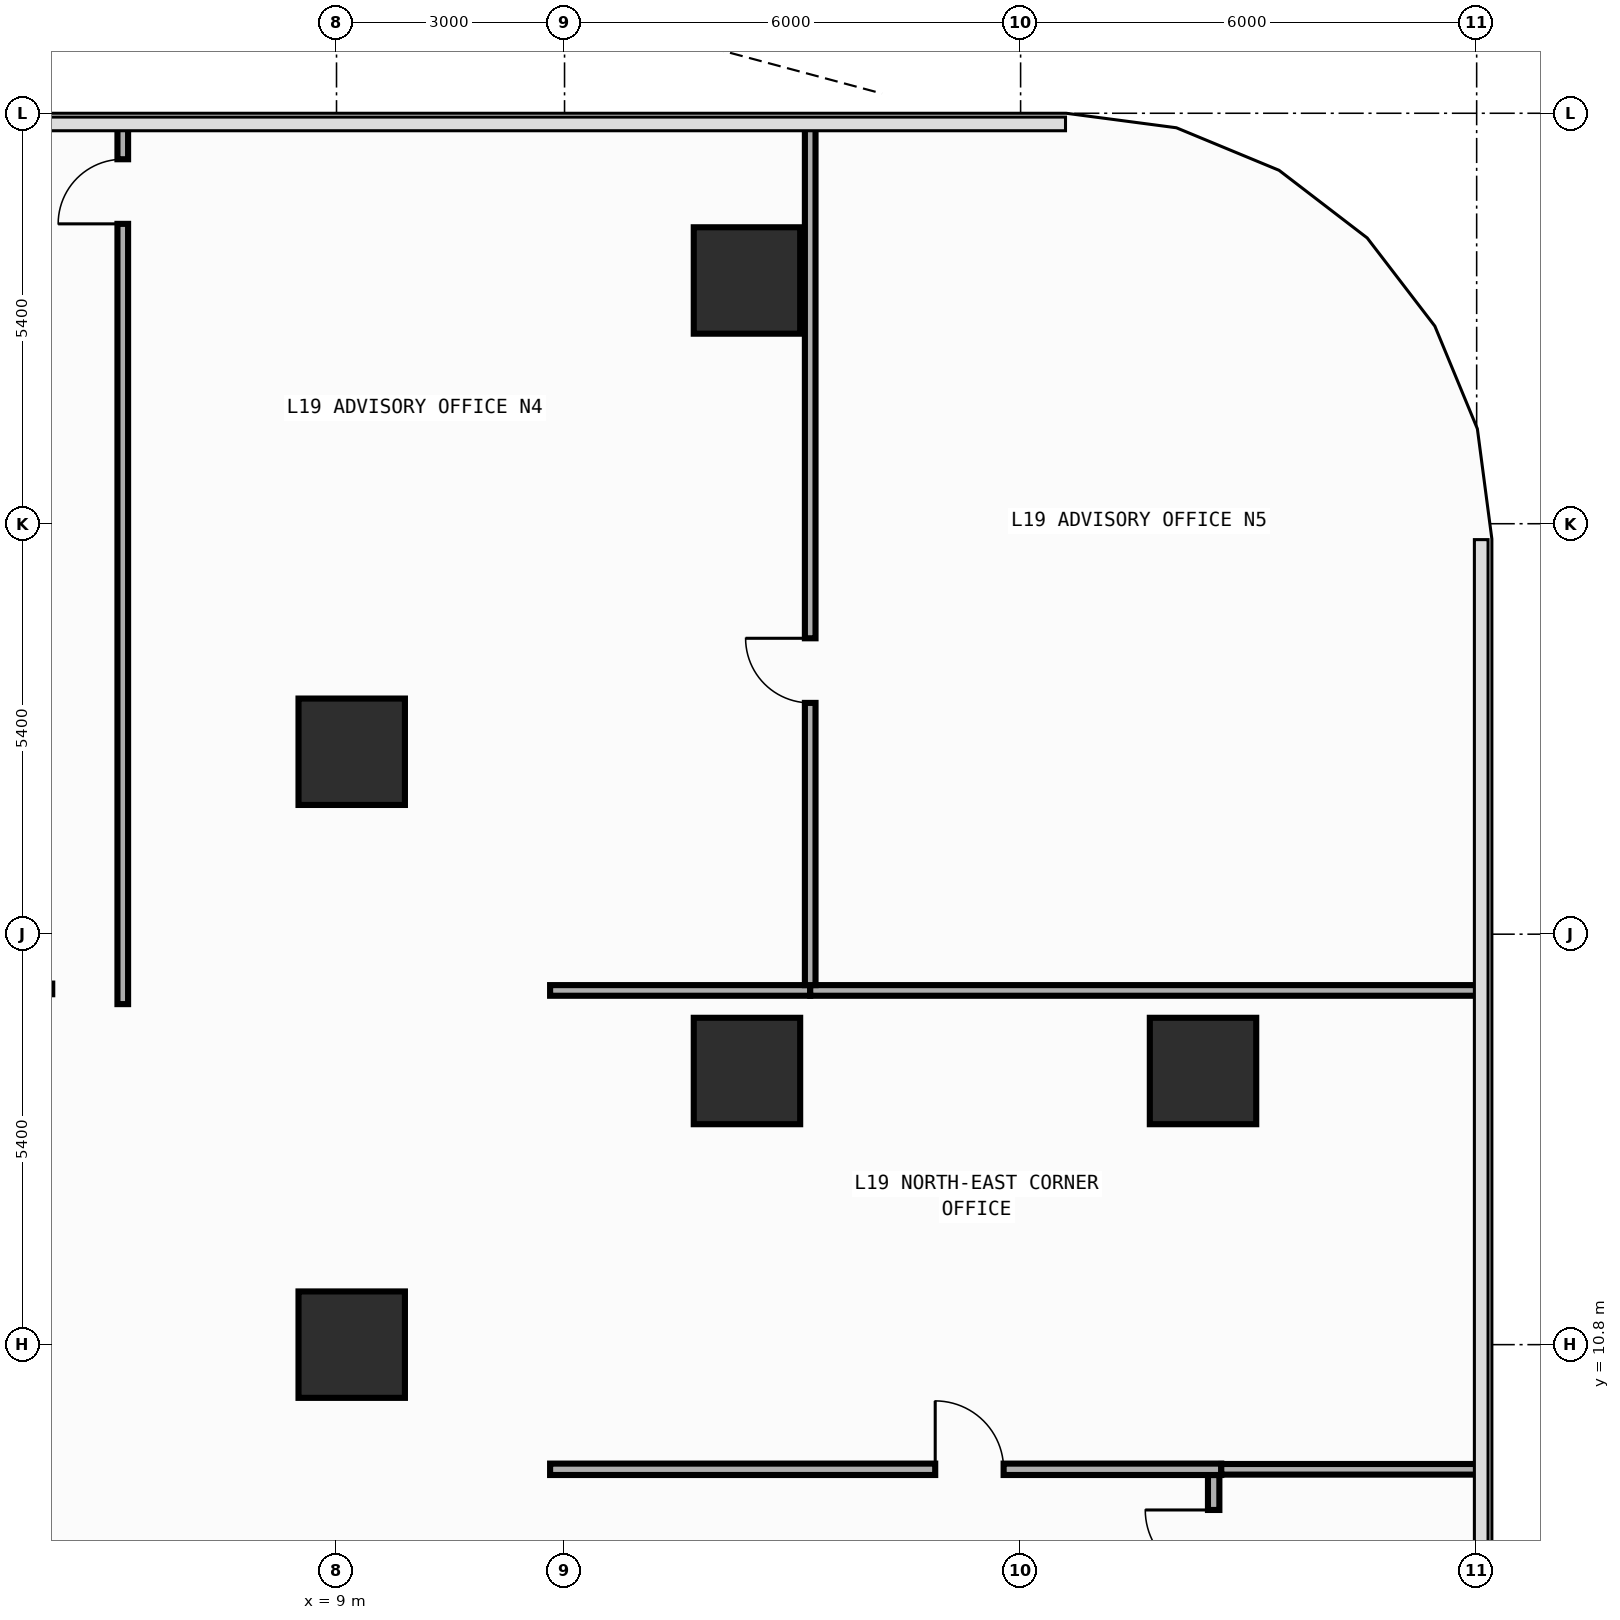
"""IFC4 building model, lengths in metres.
Left out: names, types, materials, properties, quantities, classifications, styles, units other than length and angle.
Written with IfcOpenShell. Run it as: python <this file> out.ifc"""

import sys

from ifc_helpers import new_model, si_unit, direction, frame, frame_2d, origin, origin_2d, place, context, subcontext, project, spatial, rectangle, extrude, element, fill, save


model = new_model("IFC4")
c1 = context("Model", 3, precision=1e-05, world=origin(), true_north=direction((0.0, 1.0)))
c2 = subcontext(c1, "Body", "Model", "MODEL_VIEW")
j1 = project(units=[si_unit("LENGTHUNIT", "METRE"), si_unit("PLANEANGLEUNIT", "RADIAN")], contexts=[c1])
p1 = place(None, origin())
s1 = spatial("IfcSite", under=j1, at=p1, CompositionType="ELEMENT")
p2 = place(p1, origin())
s2 = spatial("IfcBuilding", under=s1, at=p2, CompositionType="ELEMENT")
p3 = place(p2, frame((0.0, 0.0, 80.6)))
s3 = spatial("IfcBuildingStorey", under=s2, at=p3, CompositionType="ELEMENT", Elevation=80.6)
for number, where, z_axis, x_axis in (
    (1, (9.2, 10.8, 0.0), (0.0, 0.0, 1.0), (1.0, 0.0, 0.0)),
    (2, (9.2, 18.6, 0.0), (0.0, 0.0, 1.0), (1.0, 0.0, 0.0)),
    (3, (20.4, 14.4, 0.0), (0.0, 0.0, 1.0), (1.0, 0.0, 0.0)),
    (4, (14.4, 14.4, 0.0), (0.0, 0.0, 1.0), (1.0, 0.0, 0.0)),
    (5, (14.4, 24.8, 0.0), (0.0, 0.0, 1.0), (1.0, 0.0, 0.0)),
):
    element("IfcColumn", number, at=place(p3, frame(where, z_axis=z_axis, x_axis=x_axis)), inside=s3, PredefinedType="COLUMN", context=c2, shape_type="SweptSolid", body=[
        extrude(rectangle(XDim=1.4, YDim=1.4, at=origin_2d()), origin(), (0.0, 0.0, 1.0), 4.2),
    ])
p4 = place(p3, frame((20.54, 7.06, 0.0), z_axis=(0.0, 0.0, 1.0), x_axis=(0.0, 1.0, 0.0)))
e6 = element("IfcWall", 6, at=p4, inside=s3, PredefinedType="PARTITIONING", context=c2, shape_type="SweptSolid", body=[
    extrude(rectangle(XDim=2.025, YDim=0.15, at=frame_2d((1.012, 0.0))), origin(), (0.0, 0.0, 1.0), 3.85),
])
p5 = place(p4, frame((0.665, 0.0, 0.0)))
e7 = element("IfcOpeningElement", 7, at=p5, cuts=e6, PredefinedType="OPENING", context=c2, shape_type="SweptSolid", body=[
    extrude(rectangle(XDim=0.9, YDim=2.15, at=frame_2d((0.45, 1.075))), frame((0.0, 0.085, 0.0), z_axis=(0.0, -1.0, 0.0), x_axis=(1.0, 0.0, 0.0)), (0.0, 0.0, 1.0), 0.17),
])
p6 = place(p3, frame((11.81, 9.16, 0.0), z_axis=(0.0, 0.0, 1.0), x_axis=(1.0, 0.0, 0.0)))
e8 = element("IfcWall", 8, at=p6, inside=s3, PredefinedType="PARTITIONING", context=c2, shape_type="SweptSolid", body=[
    extrude(rectangle(XDim=8.83, YDim=0.15, at=frame_2d((4.415, 0.0))), origin(), (0.0, 0.0, 1.0), 3.85),
])
p7 = place(p6, frame((5.067, 0.0, 0.0)))
e9 = element("IfcOpeningElement", 9, at=p7, cuts=e8, PredefinedType="OPENING", context=c2, shape_type="SweptSolid", body=[
    extrude(rectangle(XDim=0.9, YDim=2.15, at=frame_2d((0.45, 1.075))), frame((0.0, 0.085, 0.0), z_axis=(0.0, -1.0, 0.0), x_axis=(1.0, 0.0, 0.0)), (0.0, 0.0, 1.0), 0.17),
])
p8 = place(p3, frame((20.64, 9.16, 0.0), z_axis=(0.0, 0.0, 1.0), x_axis=(1.0, 0.0, 0.0)))
e10 = element("IfcWall", 10, at=p8, inside=s3, PredefinedType="PARTITIONING", context=c2, shape_type="SweptSolid", body=[
    extrude(rectangle(XDim=3.415, YDim=0.14, at=frame_2d((1.708, 0.0))), origin(), (0.0, 0.0, 1.0), 3.85),
])
p9 = place(p3, frame((11.81, 15.46, 0.0), z_axis=(0.0, 0.0, 1.0), x_axis=(1.0, 0.0, 0.0)))
e11 = element("IfcWall", 11, at=p9, inside=s3, PredefinedType="PARTITIONING", context=c2, shape_type="SweptSolid", body=[
    extrude(rectangle(XDim=3.422, YDim=0.14, at=frame_2d((1.711, 0.0))), origin(), (0.0, 0.0, 1.0), 3.85),
])
p10 = place(p3, frame((15.232, 15.46, 0.0), z_axis=(0.0, 0.0, 1.0), x_axis=(1.0, 0.0, 0.0)))
e12 = element("IfcWall", 12, at=p10, inside=s3, PredefinedType="PARTITIONING", context=c2, shape_type="SweptSolid", body=[
    extrude(rectangle(XDim=8.823, YDim=0.14, at=frame_2d((4.412, 0.0))), origin(), (0.0, 0.0, 1.0), 3.85),
])
p11 = place(p3, frame((6.188, 15.28, 0.0), z_axis=(0.0, 0.0, 1.0), x_axis=(0.0, 1.0, 0.0)))
e13 = element("IfcWall", 13, at=p11, inside=s3, PredefinedType="PARTITIONING", context=c2, shape_type="SweptSolid", body=[
    extrude(rectangle(XDim=11.575, YDim=0.14, at=frame_2d((5.788, 0.0))), origin(), (0.0, 0.0, 1.0), 3.85),
])
p12 = place(p11, frame((10.265, 0.0, 0.0)))
e14 = element("IfcOpeningElement", 14, at=p12, cuts=e13, PredefinedType="OPENING", context=c2, shape_type="SweptSolid", body=[
    extrude(rectangle(XDim=0.85, YDim=2.1, at=frame_2d((0.425, 1.05))), frame((0.0, 0.08, 0.0), z_axis=(0.0, -1.0, 0.0), x_axis=(1.0, 0.0, 0.0)), (0.0, 0.0, 1.0), 0.16),
])
p13 = place(p3, frame((15.232, 15.53, 0.0), z_axis=(0.0, 0.0, 1.0), x_axis=(0.0, 1.0, 0.0)))
e15 = element("IfcWall", 15, at=p13, inside=s3, PredefinedType="PARTITIONING", context=c2, shape_type="SweptSolid", body=[
    extrude(rectangle(XDim=11.325, YDim=0.14, at=frame_2d((5.663, 0.0))), origin(), (0.0, 0.0, 1.0), 3.85),
])
p14 = place(p13, frame((3.713, 0.0, 0.0)))
e16 = element("IfcOpeningElement", 16, at=p14, cuts=e15, PredefinedType="OPENING", context=c2, shape_type="SweptSolid", body=[
    extrude(rectangle(XDim=0.85, YDim=2.1, at=frame_2d((0.425, 1.05))), frame((0.0, 0.08, 0.0), z_axis=(0.0, -1.0, 0.0), x_axis=(1.0, 0.0, 0.0)), (0.0, 0.0, 1.0), 0.16),
])
p15 = place(p5, origin())
e17 = element("IfcDoor", 17, at=p15, inside=s3, OperationType="SINGLE_SWING_RIGHT", PredefinedType="DOOR", context=c2, shape_type="SweptSolid", body=[
    extrude(rectangle(XDim=0.9, YDim=2.15, at=frame_2d((0.45, 1.075))), frame((0.0, 0.025, 0.0), z_axis=(0.0, -1.0, 0.0), x_axis=(1.0, 0.0, 0.0)), (0.0, 0.0, 1.0), 0.05),
])
fill(e7, e17)
p16 = place(p7, origin())
e18 = element("IfcDoor", 18, at=p16, inside=s3, OperationType="SINGLE_SWING_LEFT", PredefinedType="DOOR", context=c2, shape_type="SweptSolid", body=[
    extrude(rectangle(XDim=0.9, YDim=2.15, at=frame_2d((0.45, 1.075))), frame((0.0, 0.025, 0.0), z_axis=(0.0, -1.0, 0.0), x_axis=(1.0, 0.0, 0.0)), (0.0, 0.0, 1.0), 0.05),
])
fill(e9, e18)
p17 = place(p12, origin())
e19 = element("IfcDoor", 19, at=p17, inside=s3, OperationType="SINGLE_SWING_LEFT", PredefinedType="DOOR", context=c2, shape_type="SweptSolid", body=[
    extrude(rectangle(XDim=0.85, YDim=2.1, at=frame_2d((0.425, 1.05))), frame((0.0, 0.025, 0.0), z_axis=(0.0, -1.0, 0.0), x_axis=(1.0, 0.0, 0.0)), (0.0, 0.0, 1.0), 0.05),
])
fill(e14, e19)
p18 = place(p14, origin())
e20 = element("IfcDoor", 20, at=p18, inside=s3, OperationType="SINGLE_SWING_RIGHT", PredefinedType="DOOR", context=c2, shape_type="SweptSolid", body=[
    extrude(rectangle(XDim=0.85, YDim=2.1, at=frame_2d((0.425, 1.05))), frame((0.0, 0.025, 0.0), z_axis=(0.0, -1.0, 0.0), x_axis=(1.0, 0.0, 0.0)), (0.0, 0.0, 1.0), 0.05),
])
fill(e16, e20)
save(model, sys.argv[1])
